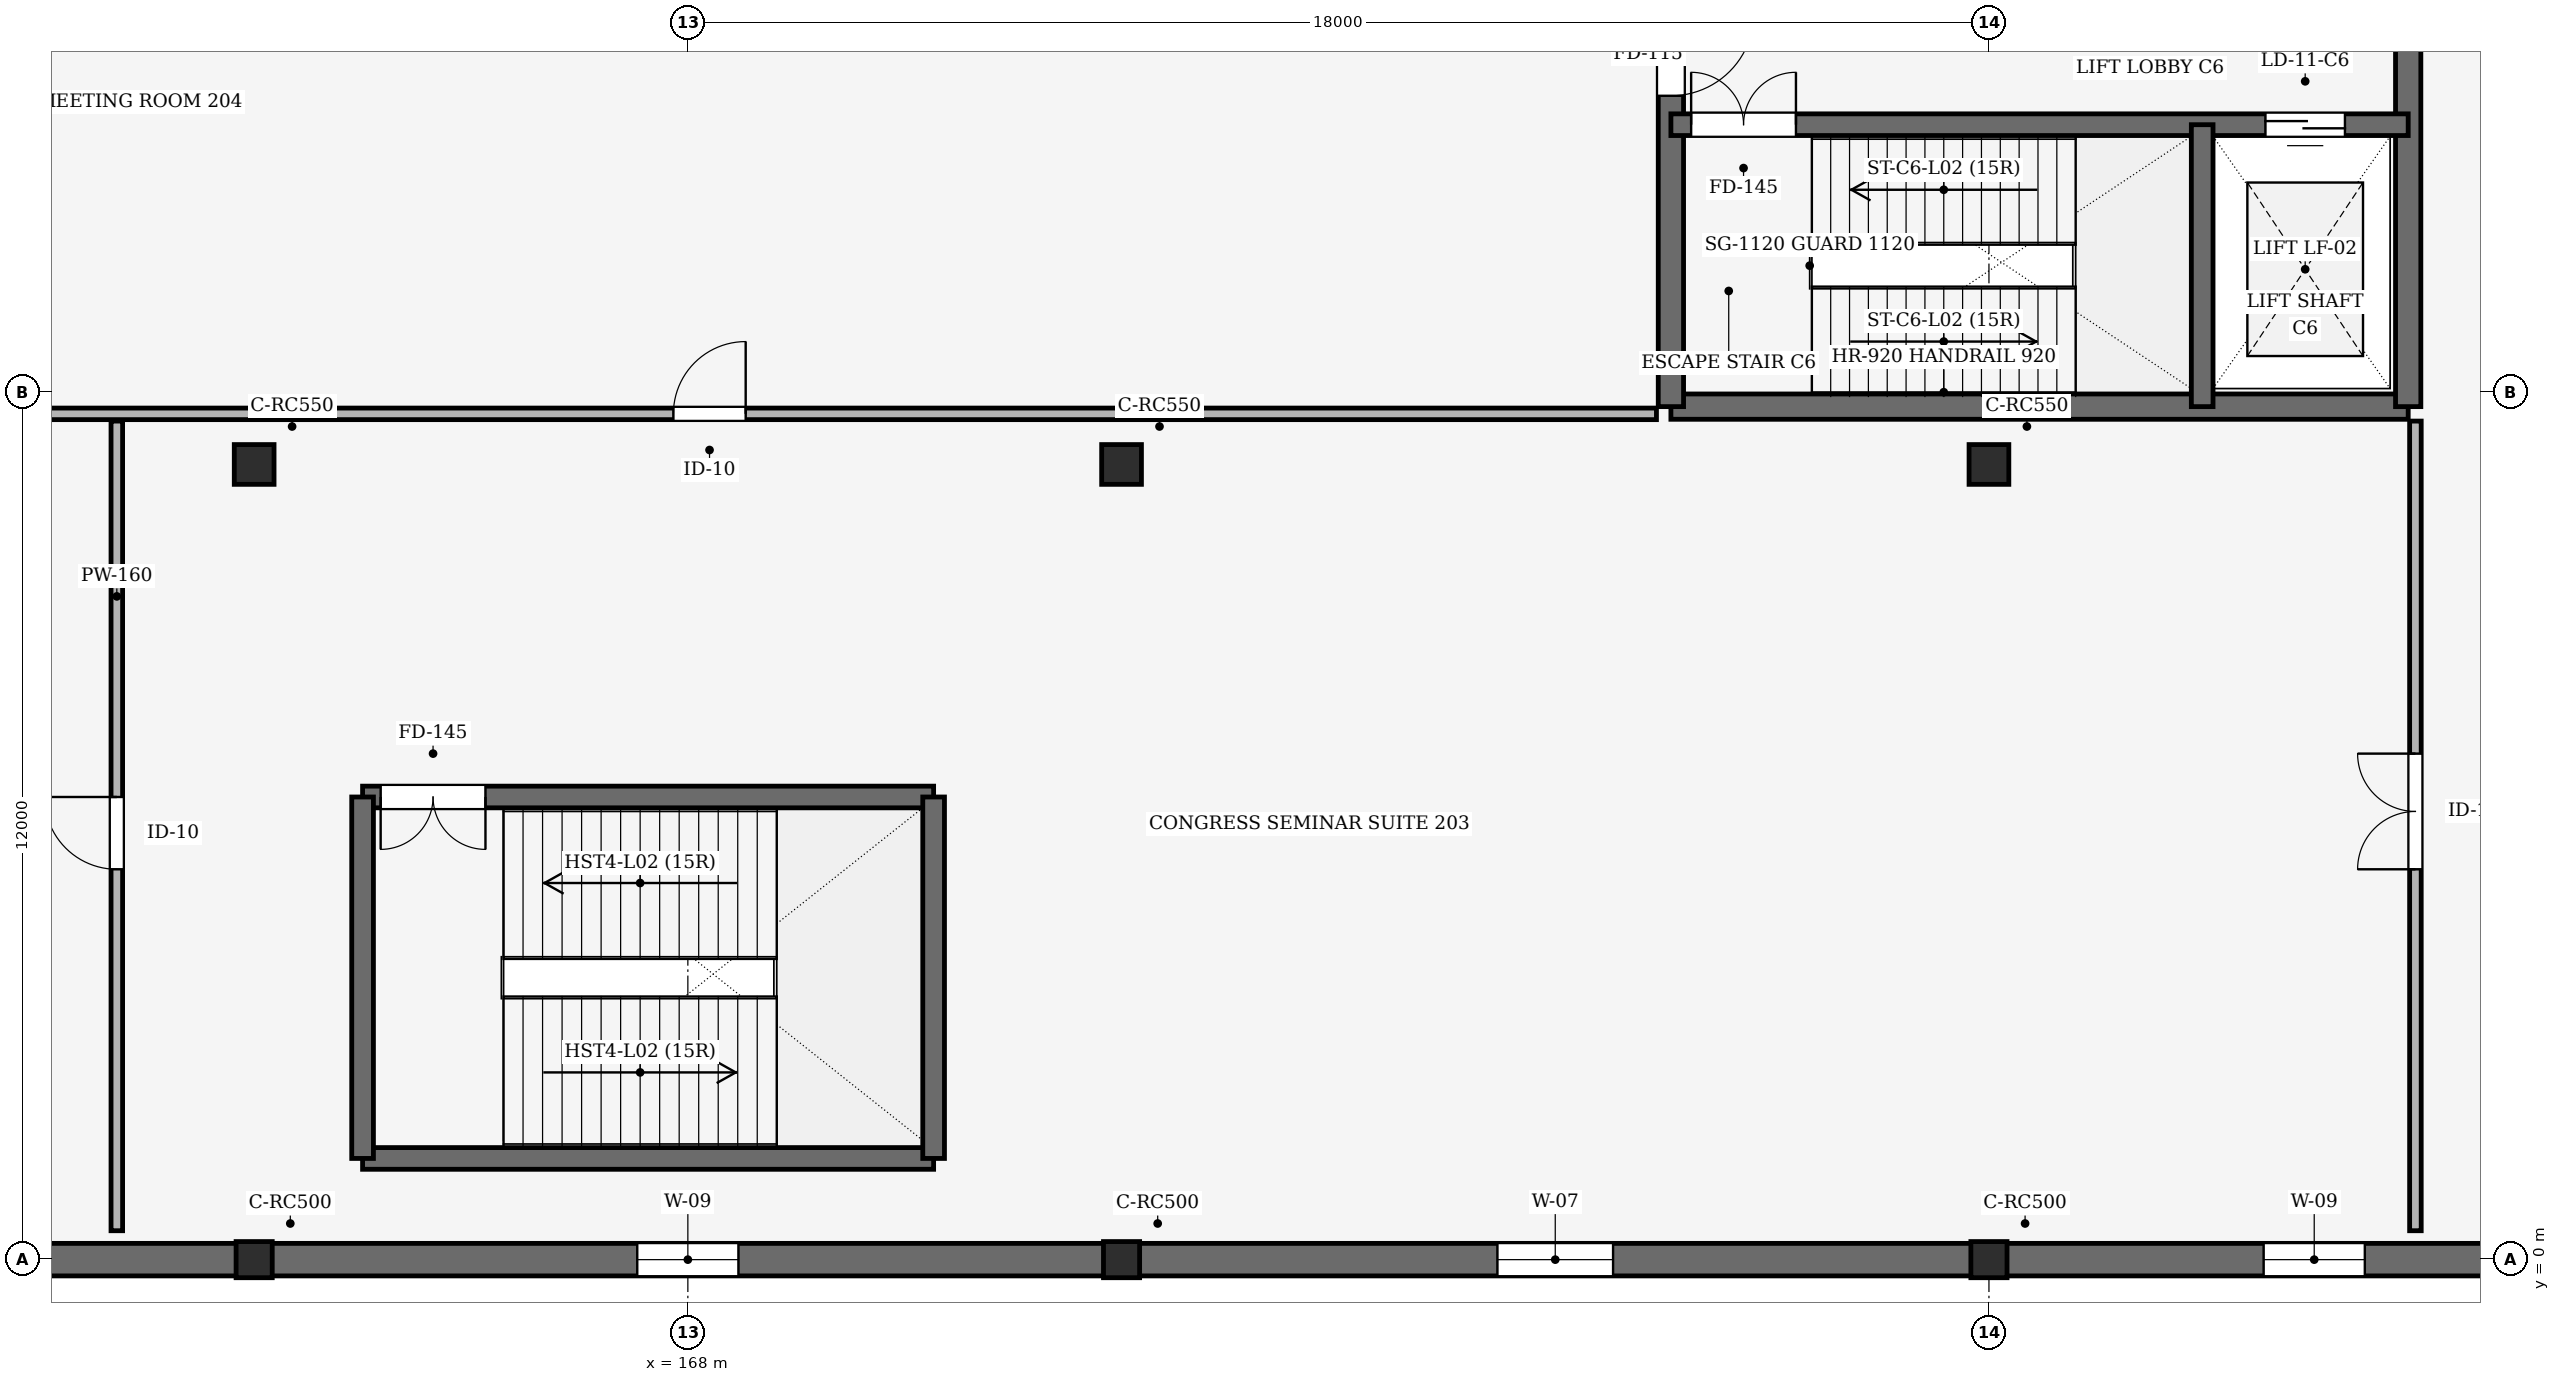
"""IFC4 building model, lengths in metres.
Left out: names, types, materials, properties, quantities, classifications, styles, units other than length and angle.
Written with IfcOpenShell. Run it as: python <this file> out.ifc"""

import sys

from ifc_helpers import new_model, si_unit, direction, frame, frame_2d, origin, origin_2d, place, context, subcontext, project, spatial, rectangle, extrude, element, fill, save


model = new_model("IFC4")
c1 = context("Model", 3, precision=1e-05, world=origin(), true_north=direction((0.0, 1.0)))
c2 = subcontext(c1, "Body", "Model", "MODEL_VIEW")
j1 = project(units=[si_unit("LENGTHUNIT", "METRE"), si_unit("PLANEANGLEUNIT", "RADIAN")], contexts=[c1])
p1 = place(None, origin())
s1 = spatial("IfcSite", under=j1, at=p1, CompositionType="ELEMENT")
p2 = place(p1, origin())
s2 = spatial("IfcBuilding", under=s1, at=p2, CompositionType="ELEMENT")
p3 = place(p2, frame((0.0, 0.0, 10.8)))
s3 = spatial("IfcBuildingStorey", under=s2, at=p3, CompositionType="ELEMENT", Elevation=10.8)
p4 = place(p3, frame((162.0, 0.0, 0.0), z_axis=(0.0, 0.0, 1.0), x_axis=(1.0, 0.0, 0.0)))
e1 = element("IfcColumn", 1, at=p4, inside=s3, PredefinedType="COLUMN", context=c2, shape_type="SweptSolid", body=[
    extrude(rectangle(XDim=0.5, YDim=0.5, at=origin_2d()), origin(), (0.0, 0.0, 1.0), 5.4),
])
p5 = place(p3, frame((162.0, 11.0, 0.0), z_axis=(0.0, 0.0, 1.0), x_axis=(1.0, 0.0, 0.0)))
e2 = element("IfcColumn", 2, at=p5, inside=s3, PredefinedType="COLUMN", context=c2, shape_type="SweptSolid", body=[
    extrude(rectangle(XDim=0.55, YDim=0.55, at=origin_2d()), origin(), (0.0, 0.0, 1.0), 5.4),
])
p6 = place(p3, frame((174.0, 0.0, 0.0), z_axis=(0.0, 0.0, 1.0), x_axis=(1.0, 0.0, 0.0)))
e3 = element("IfcColumn", 3, at=p6, inside=s3, PredefinedType="COLUMN", context=c2, shape_type="SweptSolid", body=[
    extrude(rectangle(XDim=0.5, YDim=0.5, at=origin_2d()), origin(), (0.0, 0.0, 1.0), 5.4),
])
p7 = place(p3, frame((174.0, 11.0, 0.0), z_axis=(0.0, 0.0, 1.0), x_axis=(1.0, 0.0, 0.0)))
e4 = element("IfcColumn", 4, at=p7, inside=s3, PredefinedType="COLUMN", context=c2, shape_type="SweptSolid", body=[
    extrude(rectangle(XDim=0.55, YDim=0.55, at=origin_2d()), origin(), (0.0, 0.0, 1.0), 5.4),
])
p8 = place(p3, frame((186.0, 0.0, 0.0), z_axis=(0.0, 0.0, 1.0), x_axis=(1.0, 0.0, 0.0)))
e5 = element("IfcColumn", 5, at=p8, inside=s3, PredefinedType="COLUMN", context=c2, shape_type="SweptSolid", body=[
    extrude(rectangle(XDim=0.5, YDim=0.5, at=origin_2d()), origin(), (0.0, 0.0, 1.0), 5.4),
])
p9 = place(p3, frame((186.0, 11.0, 0.0), z_axis=(0.0, 0.0, 1.0), x_axis=(1.0, 0.0, 0.0)))
e6 = element("IfcColumn", 6, at=p9, inside=s3, PredefinedType="COLUMN", context=c2, shape_type="SweptSolid", body=[
    extrude(rectangle(XDim=0.55, YDim=0.55, at=origin_2d()), origin(), (0.0, 0.0, 1.0), 5.4),
])
p10 = place(p3, frame((150.0, 0.0, 0.0), z_axis=(0.0, 0.0, 1.0), x_axis=(1.0, 0.0, 0.0)))
e7 = element("IfcWall", 7, at=p10, inside=s3, PredefinedType="SOLIDWALL", context=c2, shape_type="SweptSolid", body=[
    extrude(rectangle(XDim=12.0, YDim=0.45, at=frame_2d((6.0, 0.0))), origin(), (0.0, 0.0, 1.0), 4.35),
])
p11 = place(p10, frame((5.2, 0.0, 0.9)))
e8 = element("IfcOpeningElement", 8, at=p11, cuts=e7, PredefinedType="OPENING", context=c2, shape_type="SweptSolid", body=[
    extrude(rectangle(XDim=1.6, YDim=2.35, at=frame_2d((0.8, 1.175))), frame((0.0, 0.235, 0.0), z_axis=(0.0, -1.0, 0.0), x_axis=(1.0, 0.0, 0.0)), (0.0, 0.0, 1.0), 0.47),
])
p12 = place(p3, frame((162.0, 0.0, 0.0), z_axis=(0.0, 0.0, 1.0), x_axis=(1.0, 0.0, 0.0)))
e9 = element("IfcWall", 9, at=p12, inside=s3, PredefinedType="SOLIDWALL", context=c2, shape_type="SweptSolid", body=[
    extrude(rectangle(XDim=12.0, YDim=0.45, at=frame_2d((6.0, 0.0))), origin(), (0.0, 0.0, 1.0), 4.35),
])
p13 = place(p12, frame((5.3, 0.0, 0.9)))
e10 = element("IfcOpeningElement", 10, at=p13, cuts=e9, PredefinedType="OPENING", context=c2, shape_type="SweptSolid", body=[
    extrude(rectangle(XDim=1.4, YDim=2.0, at=frame_2d((0.7, 1.0))), frame((0.0, 0.235, 0.0), z_axis=(0.0, -1.0, 0.0), x_axis=(1.0, 0.0, 0.0)), (0.0, 0.0, 1.0), 0.47),
])
p14 = place(p3, frame((174.0, 0.0, 0.0), z_axis=(0.0, 0.0, 1.0), x_axis=(1.0, 0.0, 0.0)))
e11 = element("IfcWall", 11, at=p14, inside=s3, PredefinedType="SOLIDWALL", context=c2, shape_type="SweptSolid", body=[
    extrude(rectangle(XDim=12.0, YDim=0.45, at=frame_2d((6.0, 0.0))), origin(), (0.0, 0.0, 1.0), 4.35),
])
p15 = place(p14, frame((5.2, 0.0, 0.9)))
e12 = element("IfcOpeningElement", 12, at=p15, cuts=e11, PredefinedType="OPENING", context=c2, shape_type="SweptSolid", body=[
    extrude(rectangle(XDim=1.6, YDim=2.35, at=frame_2d((0.8, 1.175))), frame((0.0, 0.235, 0.0), z_axis=(0.0, -1.0, 0.0), x_axis=(1.0, 0.0, 0.0)), (0.0, 0.0, 1.0), 0.47),
])
p16 = place(p3, frame((186.0, 0.0, 0.0), z_axis=(0.0, 0.0, 1.0), x_axis=(1.0, 0.0, 0.0)))
e13 = element("IfcWall", 13, at=p16, inside=s3, PredefinedType="SOLIDWALL", context=c2, shape_type="SweptSolid", body=[
    extrude(rectangle(XDim=9.0, YDim=0.45, at=frame_2d((4.5, 0.0))), origin(), (0.0, 0.0, 1.0), 4.35),
])
p17 = place(p16, frame((3.8, 0.0, 0.9)))
e14 = element("IfcOpeningElement", 14, at=p17, cuts=e13, PredefinedType="OPENING", context=c2, shape_type="SweptSolid", body=[
    extrude(rectangle(XDim=1.4, YDim=2.0, at=frame_2d((0.7, 1.0))), frame((0.0, 0.235, 0.0), z_axis=(0.0, -1.0, 0.0), x_axis=(1.0, 0.0, 0.0)), (0.0, 0.0, 1.0), 0.47),
])
p18 = place(p3, frame((181.6, 11.8, 0.0), z_axis=(0.0, 0.0, 1.0), x_axis=(1.0, 0.0, 0.0)))
e15 = element("IfcWall", 15, at=p18, inside=s3, PredefinedType="SHEAR", context=c2, shape_type="SweptSolid", body=[
    extrude(rectangle(XDim=10.2, YDim=0.35, at=frame_2d((5.1, 0.0))), origin(), (0.0, 0.0, 1.0), 5.4),
])
p19 = place(p3, frame((181.6, 20.2, 0.0), z_axis=(0.0, 0.0, 1.0), x_axis=(0.0, -1.0, 0.0)))
e16 = element("IfcWall", 16, at=p19, inside=s3, PredefinedType="SHEAR", context=c2, shape_type="SweptSolid", body=[
    extrude(rectangle(XDim=8.4, YDim=0.35, at=frame_2d((4.2, 0.0))), origin(), (0.0, 0.0, 1.0), 5.4),
])
p20 = place(p19, frame((2.95, 0.0, 0.0)))
e17 = element("IfcOpeningElement", 17, at=p20, cuts=e16, PredefinedType="OPENING", context=c2, shape_type="SweptSolid", body=[
    extrude(rectangle(XDim=1.15, YDim=2.15, at=frame_2d((0.575, 1.075))), frame((0.0, 0.185, 0.0), z_axis=(0.0, -1.0, 0.0), x_axis=(1.0, 0.0, 0.0)), (0.0, 0.0, 1.0), 0.37),
])
p21 = place(p3, frame((191.8, 11.8, 0.0), z_axis=(0.0, 0.0, 1.0), x_axis=(0.0, 1.0, 0.0)))
e18 = element("IfcWall", 18, at=p21, inside=s3, PredefinedType="SHEAR", context=c2, shape_type="SweptSolid", body=[
    extrude(rectangle(XDim=8.4, YDim=0.35, at=frame_2d((4.2, 0.0))), origin(), (0.0, 0.0, 1.0), 5.4),
])
p22 = place(p3, frame((181.6, 15.7, 0.0), z_axis=(0.0, 0.0, 1.0), x_axis=(1.0, 0.0, 0.0)))
e19 = element("IfcWall", 19, at=p22, inside=s3, PredefinedType="SHEAR", context=c2, shape_type="SweptSolid", body=[
    extrude(rectangle(XDim=10.2, YDim=0.3, at=frame_2d((5.1, 0.0))), origin(), (0.0, 0.0, 1.0), 5.4),
])
p23 = place(p22, frame((0.28, 0.0, 0.0)))
e20 = element("IfcOpeningElement", 20, at=p23, cuts=e19, PredefinedType="OPENING", context=c2, shape_type="SweptSolid", body=[
    extrude(rectangle(XDim=1.45, YDim=2.15, at=frame_2d((0.725, 1.075))), frame((0.0, 0.16, 0.0), z_axis=(0.0, -1.0, 0.0), x_axis=(1.0, 0.0, 0.0)), (0.0, 0.0, 1.0), 0.32),
])
p24 = place(p22, frame((8.225, 0.0, 0.0)))
e21 = element("IfcOpeningElement", 21, at=p24, cuts=e19, PredefinedType="OPENING", context=c2, shape_type="SweptSolid", body=[
    extrude(rectangle(XDim=1.1, YDim=2.15, at=frame_2d((0.55, 1.075))), frame((0.0, 0.16, 0.0), z_axis=(0.0, -1.0, 0.0), x_axis=(1.0, 0.0, 0.0)), (0.0, 0.0, 1.0), 0.32),
])
p25 = place(p3, frame((188.95, 11.8, 0.0), z_axis=(0.0, 0.0, 1.0), x_axis=(0.0, 1.0, 0.0)))
e22 = element("IfcWall", 22, at=p25, inside=s3, PredefinedType="SHEAR", context=c2, shape_type="SweptSolid", body=[
    extrude(rectangle(XDim=3.9, YDim=0.3, at=frame_2d((1.95, 0.0))), origin(), (0.0, 0.0, 1.0), 5.4),
])
p26 = place(p3, frame((163.5, 1.4, 0.0), z_axis=(0.0, 0.0, 1.0), x_axis=(1.0, 0.0, 0.0)))
e23 = element("IfcWall", 23, at=p26, inside=s3, PredefinedType="SHEAR", context=c2, shape_type="SweptSolid", body=[
    extrude(rectangle(XDim=7.9, YDim=0.3, at=frame_2d((3.95, 0.0))), origin(), (0.0, 0.0, 1.0), 5.4),
])
p27 = place(p3, frame((171.4, 6.4, 0.0), z_axis=(0.0, 0.0, 1.0), x_axis=(-1.0, 0.0, 0.0)))
e24 = element("IfcWall", 24, at=p27, inside=s3, PredefinedType="SHEAR", context=c2, shape_type="SweptSolid", body=[
    extrude(rectangle(XDim=7.9, YDim=0.3, at=frame_2d((3.95, 0.0))), origin(), (0.0, 0.0, 1.0), 5.4),
])
p28 = place(p27, frame((6.2, 0.0, 0.0)))
e25 = element("IfcOpeningElement", 25, at=p28, cuts=e24, PredefinedType="OPENING", context=c2, shape_type="SweptSolid", body=[
    extrude(rectangle(XDim=1.45, YDim=2.15, at=frame_2d((0.725, 1.075))), frame((0.0, 0.16, 0.0), z_axis=(0.0, -1.0, 0.0), x_axis=(1.0, 0.0, 0.0)), (0.0, 0.0, 1.0), 0.32),
])
for number, where, z_axis, x_axis in (
    (26, (163.5, 6.4, 0.0), (0.0, 0.0, 1.0), (0.0, -1.0, 0.0)),
    (27, (171.4, 1.4, 0.0), (0.0, 0.0, 1.0), (0.0, 1.0, 0.0)),
):
    element("IfcWall", number, at=place(p3, frame(where, z_axis=z_axis, x_axis=x_axis)), inside=s3, PredefinedType="SHEAR", context=c2, shape_type="SweptSolid", body=[
        extrude(rectangle(XDim=5.0, YDim=0.3, at=frame_2d((2.5, 0.0))), origin(), (0.0, 0.0, 1.0), 5.4),
    ])
p29 = place(p3, frame((160.1, 0.4, 0.0), z_axis=(0.0, 0.0, 1.0), x_axis=(0.0, 1.0, 0.0)))
e28 = element("IfcWall", 28, at=p29, inside=s3, PredefinedType="PARTITIONING", context=c2, shape_type="SweptSolid", body=[
    extrude(rectangle(XDim=11.2, YDim=0.16, at=frame_2d((5.6, 0.0))), origin(), (0.0, 0.0, 1.0), 3.6),
])
p30 = place(p29, frame((5.0, 0.0, 0.0)))
e29 = element("IfcOpeningElement", 29, at=p30, cuts=e28, PredefinedType="OPENING", context=c2, shape_type="SweptSolid", body=[
    extrude(rectangle(XDim=1.0, YDim=2.15, at=frame_2d((0.5, 1.075))), frame((0.0, 0.09, 0.0), z_axis=(0.0, -1.0, 0.0), x_axis=(1.0, 0.0, 0.0)), (0.0, 0.0, 1.0), 0.18),
])
p31 = place(p3, frame((137.8, 11.7, 0.0), z_axis=(0.0, 0.0, 1.0), x_axis=(1.0, 0.0, 0.0)))
e30 = element("IfcWall", 30, at=p31, inside=s3, PredefinedType="PARTITIONING", context=c2, shape_type="SweptSolid", body=[
    extrude(rectangle(XDim=43.6, YDim=0.16, at=frame_2d((21.8, 0.0))), origin(), (0.0, 0.0, 1.0), 3.6),
])
p32 = place(p31, frame((8.0, 0.0, 0.0)))
e31 = element("IfcOpeningElement", 31, at=p32, cuts=e30, PredefinedType="OPENING", context=c2, shape_type="SweptSolid", body=[
    extrude(rectangle(XDim=1.0, YDim=2.15, at=frame_2d((0.5, 1.075))), frame((0.0, 0.09, 0.0), z_axis=(0.0, -1.0, 0.0), x_axis=(1.0, 0.0, 0.0)), (0.0, 0.0, 1.0), 0.18),
])
p33 = place(p31, frame((30.0, 0.0, 0.0)))
e32 = element("IfcOpeningElement", 32, at=p33, cuts=e30, PredefinedType="OPENING", context=c2, shape_type="SweptSolid", body=[
    extrude(rectangle(XDim=1.0, YDim=2.15, at=frame_2d((0.5, 1.075))), frame((0.0, 0.09, 0.0), z_axis=(0.0, -1.0, 0.0), x_axis=(1.0, 0.0, 0.0)), (0.0, 0.0, 1.0), 0.18),
])
p34 = place(p3, frame((191.9, 0.4, 0.0), z_axis=(0.0, 0.0, 1.0), x_axis=(0.0, 1.0, 0.0)))
e33 = element("IfcWall", 33, at=p34, inside=s3, PredefinedType="PARTITIONING", context=c2, shape_type="SweptSolid", body=[
    extrude(rectangle(XDim=11.2, YDim=0.16, at=frame_2d((5.6, 0.0))), origin(), (0.0, 0.0, 1.0), 3.6),
])
p35 = place(p34, frame((5.0, 0.0, 0.0)))
e34 = element("IfcOpeningElement", 34, at=p35, cuts=e33, PredefinedType="OPENING", context=c2, shape_type="SweptSolid", body=[
    extrude(rectangle(XDim=1.6, YDim=2.2, at=frame_2d((0.8, 1.1))), frame((0.0, 0.09, 0.0), z_axis=(0.0, -1.0, 0.0), x_axis=(1.0, 0.0, 0.0)), (0.0, 0.0, 1.0), 0.18),
])
p36 = place(p13, origin())
e35 = element("IfcWindow", 35, at=p36, inside=s3, PartitioningType="DOUBLE_PANEL_VERTICAL", PredefinedType="WINDOW", context=c2, shape_type="SweptSolid", body=[
    extrude(rectangle(XDim=1.4, YDim=2.0, at=frame_2d((0.7, 1.0))), frame((0.0, 0.03, 0.0), z_axis=(0.0, -1.0, 0.0), x_axis=(1.0, 0.0, 0.0)), (0.0, 0.0, 1.0), 0.06),
])
fill(e10, e35)
p37 = place(p15, origin())
e36 = element("IfcWindow", 36, at=p37, inside=s3, PartitioningType="DOUBLE_PANEL_VERTICAL", PredefinedType="WINDOW", context=c2, shape_type="SweptSolid", body=[
    extrude(rectangle(XDim=1.6, YDim=2.35, at=frame_2d((0.8, 1.175))), frame((0.0, 0.03, 0.0), z_axis=(0.0, -1.0, 0.0), x_axis=(1.0, 0.0, 0.0)), (0.0, 0.0, 1.0), 0.06),
])
fill(e12, e36)
p38 = place(p17, origin())
e37 = element("IfcWindow", 37, at=p38, inside=s3, PartitioningType="DOUBLE_PANEL_VERTICAL", PredefinedType="WINDOW", context=c2, shape_type="SweptSolid", body=[
    extrude(rectangle(XDim=1.4, YDim=2.0, at=frame_2d((0.7, 1.0))), frame((0.0, 0.03, 0.0), z_axis=(0.0, -1.0, 0.0), x_axis=(1.0, 0.0, 0.0)), (0.0, 0.0, 1.0), 0.06),
])
fill(e14, e37)
p39 = place(p20, origin())
e38 = element("IfcDoor", 38, at=p39, inside=s3, OperationType="SINGLE_SWING_LEFT", PredefinedType="DOOR", context=c2, shape_type="SweptSolid", body=[
    extrude(rectangle(XDim=1.15, YDim=2.15, at=frame_2d((0.575, 1.075))), frame((0.0, 0.025, 0.0), z_axis=(0.0, -1.0, 0.0), x_axis=(1.0, 0.0, 0.0)), (0.0, 0.0, 1.0), 0.05),
])
fill(e17, e38)
p40 = place(p23, origin())
e39 = element("IfcDoor", 39, at=p40, inside=s3, OperationType="DOUBLE_DOOR_SINGLE_SWING", PredefinedType="DOOR", context=c2, shape_type="SweptSolid", body=[
    extrude(rectangle(XDim=1.45, YDim=2.15, at=frame_2d((0.725, 1.075))), frame((0.0, 0.025, 0.0), z_axis=(0.0, -1.0, 0.0), x_axis=(1.0, 0.0, 0.0)), (0.0, 0.0, 1.0), 0.05),
])
fill(e20, e39)
p41 = place(p24, origin())
e40 = element("IfcDoor", 40, at=p41, inside=s3, OperationType="DOUBLE_DOOR_SLIDING", PredefinedType="DOOR", context=c2, shape_type="SweptSolid", body=[
    extrude(rectangle(XDim=1.1, YDim=2.15, at=frame_2d((0.55, 1.075))), frame((0.0, 0.025, 0.0), z_axis=(0.0, -1.0, 0.0), x_axis=(1.0, 0.0, 0.0)), (0.0, 0.0, 1.0), 0.05),
])
fill(e21, e40)
p42 = place(p28, origin())
e41 = element("IfcDoor", 41, at=p42, inside=s3, OperationType="DOUBLE_DOOR_SINGLE_SWING", PredefinedType="DOOR", context=c2, shape_type="SweptSolid", body=[
    extrude(rectangle(XDim=1.45, YDim=2.15, at=frame_2d((0.725, 1.075))), frame((0.0, 0.025, 0.0), z_axis=(0.0, -1.0, 0.0), x_axis=(1.0, 0.0, 0.0)), (0.0, 0.0, 1.0), 0.05),
])
fill(e25, e41)
p43 = place(p30, origin())
e42 = element("IfcDoor", 42, at=p43, inside=s3, OperationType="SINGLE_SWING_RIGHT", PredefinedType="DOOR", context=c2, shape_type="SweptSolid", body=[
    extrude(rectangle(XDim=1.0, YDim=2.15, at=frame_2d((0.5, 1.075))), frame((0.0, 0.025, 0.0), z_axis=(0.0, -1.0, 0.0), x_axis=(1.0, 0.0, 0.0)), (0.0, 0.0, 1.0), 0.05),
])
fill(e29, e42)
p44 = place(p33, origin())
e43 = element("IfcDoor", 43, at=p44, inside=s3, OperationType="SINGLE_SWING_RIGHT", PredefinedType="DOOR", context=c2, shape_type="SweptSolid", body=[
    extrude(rectangle(XDim=1.0, YDim=2.15, at=frame_2d((0.5, 1.075))), frame((0.0, 0.025, 0.0), z_axis=(0.0, -1.0, 0.0), x_axis=(1.0, 0.0, 0.0)), (0.0, 0.0, 1.0), 0.05),
])
fill(e32, e43)
p45 = place(p35, origin())
e44 = element("IfcDoor", 44, at=p45, inside=s3, OperationType="DOUBLE_DOOR_SINGLE_SWING", PredefinedType="DOOR", context=c2, shape_type="SweptSolid", body=[
    extrude(rectangle(XDim=1.6, YDim=2.2, at=frame_2d((0.8, 1.1))), frame((0.0, 0.025, 0.0), z_axis=(0.0, -1.0, 0.0), x_axis=(1.0, 0.0, 0.0)), (0.0, 0.0, 1.0), 0.05),
])
fill(e34, e44)
save(model, sys.argv[1])
